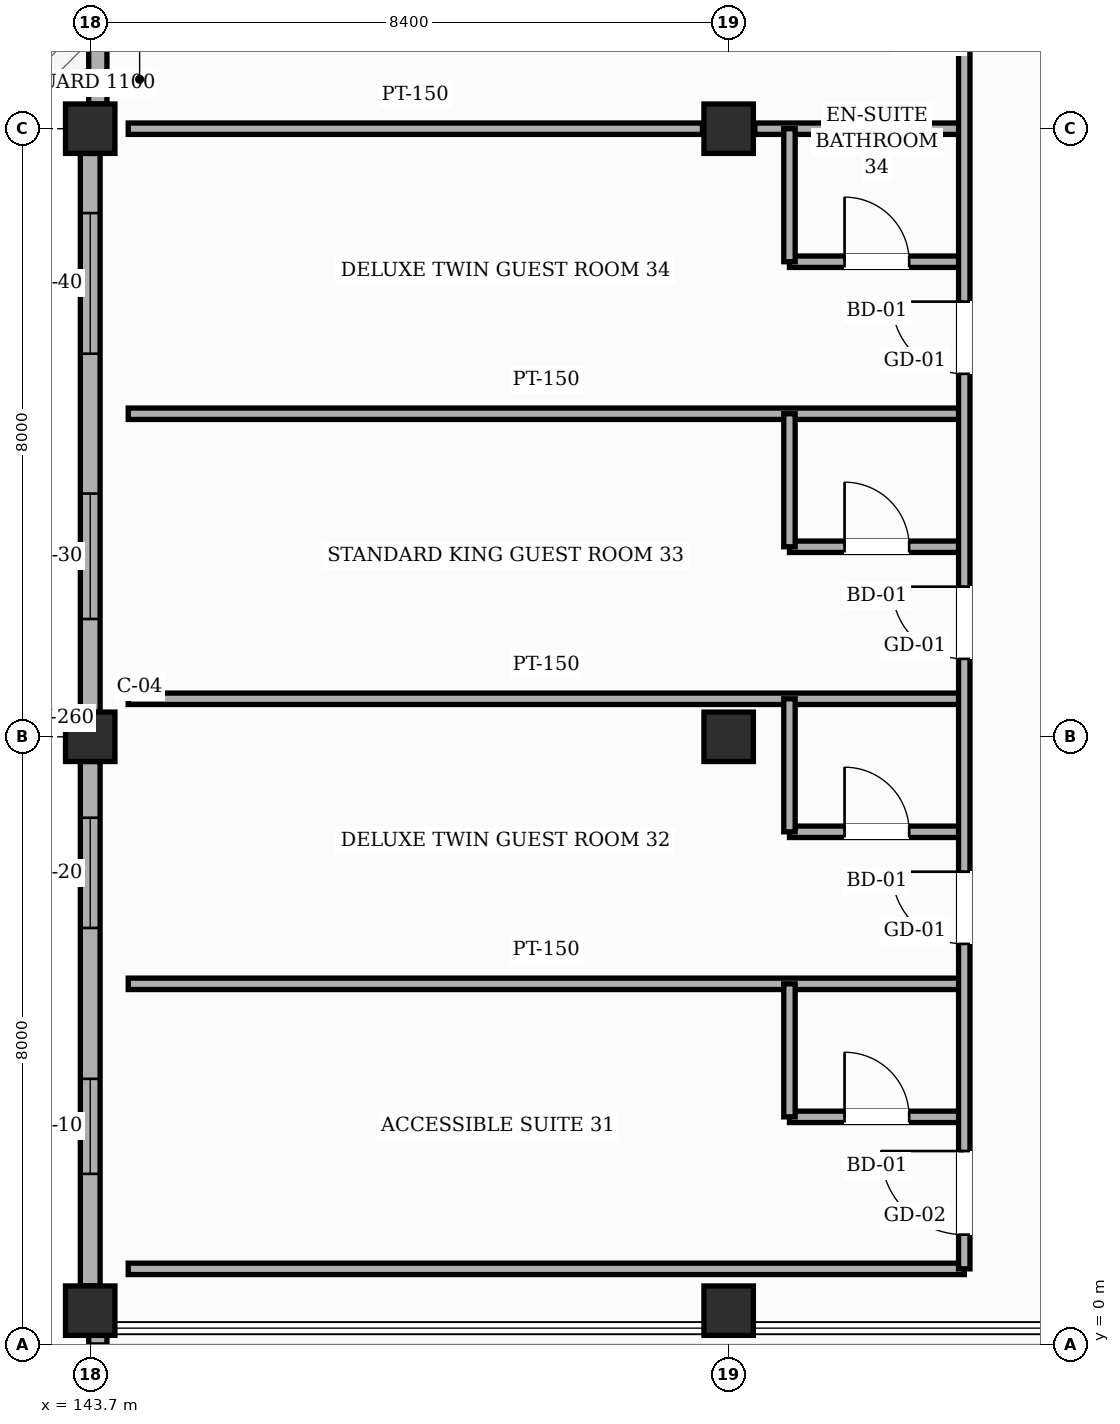
"""IFC4 building model, lengths in metres.
Left out: names, types, materials, properties, quantities, classifications, styles, units other than length and angle.
Written with IfcOpenShell. Run it as: python <this file> out.ifc"""

import sys

from ifc_helpers import new_model, si_unit, direction, frame, frame_2d, origin, origin_2d, place, context, subcontext, project, spatial, rectangle, hollow_rectangle, extrude, element, fill, save


model = new_model("IFC4")
c1 = context("Model", 3, precision=1e-05, world=origin(), true_north=direction((0.0, 1.0)))
c2 = subcontext(c1, "Body", "Model", "MODEL_VIEW")
j1 = project(units=[si_unit("LENGTHUNIT", "METRE"), si_unit("PLANEANGLEUNIT", "RADIAN")], contexts=[c1])
p1 = place(None, origin())
s1 = spatial("IfcSite", under=j1, at=p1, CompositionType="ELEMENT")
p2 = place(p1, origin())
s2 = spatial("IfcBuilding", under=s1, at=p2, CompositionType="ELEMENT")
p3 = place(p2, frame((0.0, 0.0, 19.8)))
s3 = spatial("IfcBuildingStorey", under=s2, at=p3, CompositionType="ELEMENT", Elevation=19.8)
for number, where, z_axis, x_axis in (
    (1, (143.7, 0.45, 0.0), (0.0, 0.0, 1.0), (1.0, 0.0, 0.0)),
    (2, (143.7, 8.0, 0.0), (0.0, 0.0, 1.0), (1.0, 0.0, 0.0)),
    (3, (143.7, 16.0, 0.0), (0.0, 0.0, 1.0), (1.0, 0.0, 0.0)),
    (4, (152.1, 0.45, 0.0), (0.0, 0.0, 1.0), (1.0, 0.0, 0.0)),
    (5, (152.1, 8.0, 0.0), (0.0, 0.0, 1.0), (1.0, 0.0, 0.0)),
    (6, (152.1, 16.0, 0.0), (0.0, 0.0, 1.0), (1.0, 0.0, 0.0)),
):
    element("IfcColumn", number, at=place(p3, frame(where, z_axis=z_axis, x_axis=x_axis)), inside=s3, PredefinedType="COLUMN", context=c2, shape_type="SweptSolid", body=[
        extrude(hollow_rectangle(XDim=0.65, YDim=0.65, WallThickness=0.025, InnerFilletRadius=0.025, OuterFilletRadius=0.05, at=origin_2d()), origin(), (0.0, 0.0, 1.0), 4.8),
    ])
p4 = place(p3, frame((143.7, 0.775, 0.0), z_axis=(0.0, 0.0, 1.0), x_axis=(0.0, 1.0, 0.0)))
e7 = element("IfcWall", 7, at=p4, inside=s3, PredefinedType="SOLIDWALL", context=c2, shape_type="SweptSolid", body=[
    extrude(rectangle(XDim=6.9, YDim=0.26, at=frame_2d((3.45, 0.0))), origin(), (0.0, 0.0, 1.0), 4.005),
])
p5 = place(p4, frame((1.475, 0.0, 0.85)))
e8 = element("IfcOpeningElement", 8, at=p5, cuts=e7, PredefinedType="OPENING", context=c2, shape_type="SweptSolid", body=[
    extrude(rectangle(XDim=1.25, YDim=1.95, at=frame_2d((0.625, 0.975))), frame((0.0, 0.14, 0.0), z_axis=(0.0, -1.0, 0.0), x_axis=(1.0, 0.0, 0.0)), (0.0, 0.0, 1.0), 0.28),
])
p6 = place(p4, frame((4.71, 0.0, 0.85)))
e9 = element("IfcOpeningElement", 9, at=p6, cuts=e7, PredefinedType="OPENING", context=c2, shape_type="SweptSolid", body=[
    extrude(rectangle(XDim=1.45, YDim=1.95, at=frame_2d((0.725, 0.975))), frame((0.0, 0.14, 0.0), z_axis=(0.0, -1.0, 0.0), x_axis=(1.0, 0.0, 0.0)), (0.0, 0.0, 1.0), 0.28),
])
p7 = place(p3, frame((143.7, 8.325, 0.0), z_axis=(0.0, 0.0, 1.0), x_axis=(0.0, 1.0, 0.0)))
e10 = element("IfcWall", 10, at=p7, inside=s3, PredefinedType="SOLIDWALL", context=c2, shape_type="SweptSolid", body=[
    extrude(rectangle(XDim=7.35, YDim=0.26, at=frame_2d((3.675, 0.0))), origin(), (0.0, 0.0, 1.0), 4.005),
])
p8 = place(p7, frame((1.225, 0.0, 0.85)))
e11 = element("IfcOpeningElement", 11, at=p8, cuts=e10, PredefinedType="OPENING", context=c2, shape_type="SweptSolid", body=[
    extrude(rectangle(XDim=1.65, YDim=1.95, at=frame_2d((0.825, 0.975))), frame((0.0, 0.14, 0.0), z_axis=(0.0, -1.0, 0.0), x_axis=(1.0, 0.0, 0.0)), (0.0, 0.0, 1.0), 0.28),
])
p9 = place(p7, frame((4.715, 0.0, 0.85)))
e12 = element("IfcOpeningElement", 12, at=p9, cuts=e10, PredefinedType="OPENING", context=c2, shape_type="SweptSolid", body=[
    extrude(rectangle(XDim=1.85, YDim=1.95, at=frame_2d((0.925, 0.975))), frame((0.0, 0.14, 0.0), z_axis=(0.0, -1.0, 0.0), x_axis=(1.0, 0.0, 0.0)), (0.0, 0.0, 1.0), 0.28),
])
p10 = place(p3, frame((143.8, 0.0, 0.0), z_axis=(0.0, 0.0, 1.0), x_axis=(0.0, 1.0, 0.0)))
e13 = element("IfcWall", 13, at=p10, inside=s3, PredefinedType="SOLIDWALL", context=c2, shape_type="SweptSolid", body=[
    extrude(rectangle(XDim=0.36, YDim=0.24, at=frame_2d((0.18, 0.0))), origin(), (0.0, 0.0, 1.0), 4.565),
])
p11 = place(p3, frame((143.8, 16.325, 0.0), z_axis=(0.0, 0.0, 1.0), x_axis=(0.0, 1.0, 0.0)))
e14 = element("IfcWall", 14, at=p11, inside=s3, PredefinedType="SOLIDWALL", context=c2, shape_type="SweptSolid", body=[
    extrude(rectangle(XDim=1.475, YDim=0.24, at=frame_2d((0.738, 0.0))), origin(), (0.0, 0.0, 1.0), 4.005),
])
p12 = place(p3, frame((144.2, 1.0, 0.0), z_axis=(0.0, 0.0, 1.0), x_axis=(1.0, 0.0, 0.0)))
e15 = element("IfcWall", 15, at=p12, inside=s3, PredefinedType="PARTITIONING", context=c2, shape_type="SweptSolid", body=[
    extrude(rectangle(XDim=11.0, YDim=0.15, at=frame_2d((5.5, 0.0))), origin(), (0.0, 0.0, 1.0), 4.565),
])
p13 = place(p3, frame((152.9, 3.0, 0.0), z_axis=(0.0, 0.0, 1.0), x_axis=(1.0, 0.0, 0.0)))
e16 = element("IfcWall", 16, at=p13, inside=s3, PredefinedType="PARTITIONING", context=c2, shape_type="SweptSolid", body=[
    extrude(rectangle(XDim=2.3, YDim=0.15, at=frame_2d((1.15, 0.0))), origin(), (0.0, 0.0, 1.0), 4.565),
])
p14 = place(p13, frame((0.725, 0.0, 0.0)))
e17 = element("IfcOpeningElement", 17, at=p14, cuts=e16, PredefinedType="OPENING", context=c2, shape_type="SweptSolid", body=[
    extrude(rectangle(XDim=0.85, YDim=2.1, at=frame_2d((0.425, 1.05))), frame((0.0, 0.085, 0.0), z_axis=(0.0, -1.0, 0.0), x_axis=(1.0, 0.0, 0.0)), (0.0, 0.0, 1.0), 0.17),
])
p15 = place(p3, frame((144.2, 4.75, 0.0), z_axis=(0.0, 0.0, 1.0), x_axis=(1.0, 0.0, 0.0)))
e18 = element("IfcWall", 18, at=p15, inside=s3, PredefinedType="PARTITIONING", context=c2, shape_type="SweptSolid", body=[
    extrude(rectangle(XDim=11.0, YDim=0.15, at=frame_2d((5.5, 0.0))), origin(), (0.0, 0.0, 1.0), 4.565),
])
p16 = place(p3, frame((152.9, 6.75, 0.0), z_axis=(0.0, 0.0, 1.0), x_axis=(1.0, 0.0, 0.0)))
e19 = element("IfcWall", 19, at=p16, inside=s3, PredefinedType="PARTITIONING", context=c2, shape_type="SweptSolid", body=[
    extrude(rectangle(XDim=2.3, YDim=0.15, at=frame_2d((1.15, 0.0))), origin(), (0.0, 0.0, 1.0), 4.565),
])
p17 = place(p16, frame((0.725, 0.0, 0.0)))
e20 = element("IfcOpeningElement", 20, at=p17, cuts=e19, PredefinedType="OPENING", context=c2, shape_type="SweptSolid", body=[
    extrude(rectangle(XDim=0.85, YDim=2.1, at=frame_2d((0.425, 1.05))), frame((0.0, 0.085, 0.0), z_axis=(0.0, -1.0, 0.0), x_axis=(1.0, 0.0, 0.0)), (0.0, 0.0, 1.0), 0.17),
])
p18 = place(p3, frame((144.2, 8.5, 0.0), z_axis=(0.0, 0.0, 1.0), x_axis=(1.0, 0.0, 0.0)))
e21 = element("IfcWall", 21, at=p18, inside=s3, PredefinedType="PARTITIONING", context=c2, shape_type="SweptSolid", body=[
    extrude(rectangle(XDim=11.0, YDim=0.15, at=frame_2d((5.5, 0.0))), origin(), (0.0, 0.0, 1.0), 4.565),
])
p19 = place(p3, frame((152.9, 10.5, 0.0), z_axis=(0.0, 0.0, 1.0), x_axis=(1.0, 0.0, 0.0)))
e22 = element("IfcWall", 22, at=p19, inside=s3, PredefinedType="PARTITIONING", context=c2, shape_type="SweptSolid", body=[
    extrude(rectangle(XDim=2.3, YDim=0.15, at=frame_2d((1.15, 0.0))), origin(), (0.0, 0.0, 1.0), 4.565),
])
p20 = place(p19, frame((0.725, 0.0, 0.0)))
e23 = element("IfcOpeningElement", 23, at=p20, cuts=e22, PredefinedType="OPENING", context=c2, shape_type="SweptSolid", body=[
    extrude(rectangle(XDim=0.85, YDim=2.1, at=frame_2d((0.425, 1.05))), frame((0.0, 0.085, 0.0), z_axis=(0.0, -1.0, 0.0), x_axis=(1.0, 0.0, 0.0)), (0.0, 0.0, 1.0), 0.17),
])
p21 = place(p3, frame((144.2, 12.25, 0.0), z_axis=(0.0, 0.0, 1.0), x_axis=(1.0, 0.0, 0.0)))
e24 = element("IfcWall", 24, at=p21, inside=s3, PredefinedType="PARTITIONING", context=c2, shape_type="SweptSolid", body=[
    extrude(rectangle(XDim=11.0, YDim=0.15, at=frame_2d((5.5, 0.0))), origin(), (0.0, 0.0, 1.0), 4.205),
])
p22 = place(p3, frame((152.9, 14.25, 0.0), z_axis=(0.0, 0.0, 1.0), x_axis=(1.0, 0.0, 0.0)))
e25 = element("IfcWall", 25, at=p22, inside=s3, PredefinedType="PARTITIONING", context=c2, shape_type="SweptSolid", body=[
    extrude(rectangle(XDim=2.3, YDim=0.15, at=frame_2d((1.15, 0.0))), origin(), (0.0, 0.0, 1.0), 4.565),
])
p23 = place(p22, frame((0.725, 0.0, 0.0)))
e26 = element("IfcOpeningElement", 26, at=p23, cuts=e25, PredefinedType="OPENING", context=c2, shape_type="SweptSolid", body=[
    extrude(rectangle(XDim=0.85, YDim=2.1, at=frame_2d((0.425, 1.05))), frame((0.0, 0.085, 0.0), z_axis=(0.0, -1.0, 0.0), x_axis=(1.0, 0.0, 0.0)), (0.0, 0.0, 1.0), 0.17),
])
p24 = place(p3, frame((144.2, 16.0, 0.0), z_axis=(0.0, 0.0, 1.0), x_axis=(1.0, 0.0, 0.0)))
e27 = element("IfcWall", 27, at=p24, inside=s3, PredefinedType="PARTITIONING", context=c2, shape_type="SweptSolid", body=[
    extrude(rectangle(XDim=7.555, YDim=0.15, at=frame_2d((3.777, 0.0))), origin(), (0.0, 0.0, 1.0), 3.905),
])
p25 = place(p3, frame((152.445, 16.0, 0.0), z_axis=(0.0, 0.0, 1.0), x_axis=(1.0, 0.0, 0.0)))
e28 = element("IfcWall", 28, at=p25, inside=s3, PredefinedType="PARTITIONING", context=c2, shape_type="SweptSolid", body=[
    extrude(rectangle(XDim=2.755, YDim=0.15, at=frame_2d((1.377, 0.0))), origin(), (0.0, 0.0, 1.0), 3.905),
])
for number, where, z_axis, x_axis in (
    (29, (152.9, 3.0, 0.0), (0.0, 0.0, 1.0), (0.0, 1.0, 0.0)),
    (30, (152.9, 6.75, 0.0), (0.0, 0.0, 1.0), (0.0, 1.0, 0.0)),
    (31, (152.9, 10.5, 0.0), (0.0, 0.0, 1.0), (0.0, 1.0, 0.0)),
    (32, (152.9, 14.25, 0.0), (0.0, 0.0, 1.0), (0.0, 1.0, 0.0)),
):
    element("IfcWall", number, at=place(p3, frame(where, z_axis=z_axis, x_axis=x_axis)), inside=s3, PredefinedType="PARTITIONING", context=c2, shape_type="SweptSolid", body=[
        extrude(rectangle(XDim=1.75, YDim=0.15, at=frame_2d((0.875, 0.0))), origin(), (0.0, 0.0, 1.0), 4.565),
    ])
p26 = place(p3, frame((155.2, 1.0, 0.0), z_axis=(0.0, 0.0, 1.0), x_axis=(0.0, 1.0, 0.0)))
e33 = element("IfcWall", 33, at=p26, inside=s3, PredefinedType="PARTITIONING", context=c2, shape_type="SweptSolid", body=[
    extrude(rectangle(XDim=25.6, YDim=0.15, at=frame_2d((12.8, 0.0))), origin(), (0.0, 0.0, 1.0), 4.565),
])
p27 = place(p26, frame((19.55, 0.0, 0.0)))
e34 = element("IfcOpeningElement", 34, at=p27, cuts=e33, PredefinedType="OPENING", context=c2, shape_type="SweptSolid", body=[
    extrude(rectangle(XDim=1.5, YDim=2.3, at=frame_2d((0.75, 1.15))), frame((0.0, 0.085, 0.0), z_axis=(0.0, -1.0, 0.0), x_axis=(1.0, 0.0, 0.0)), (0.0, 0.0, 1.0), 0.17),
])
p28 = place(p26, frame((0.45, 0.0, 0.0)))
e35 = element("IfcOpeningElement", 35, at=p28, cuts=e33, PredefinedType="OPENING", context=c2, shape_type="SweptSolid", body=[
    extrude(rectangle(XDim=1.1, YDim=2.2, at=frame_2d((0.55, 1.1))), frame((0.0, 0.085, 0.0), z_axis=(0.0, -1.0, 0.0), x_axis=(1.0, 0.0, 0.0)), (0.0, 0.0, 1.0), 0.17),
])
p29 = place(p26, frame((4.275, 0.0, 0.0)))
e36 = element("IfcOpeningElement", 36, at=p29, cuts=e33, PredefinedType="OPENING", context=c2, shape_type="SweptSolid", body=[
    extrude(rectangle(XDim=0.95, YDim=2.15, at=frame_2d((0.475, 1.075))), frame((0.0, 0.085, 0.0), z_axis=(0.0, -1.0, 0.0), x_axis=(1.0, 0.0, 0.0)), (0.0, 0.0, 1.0), 0.17),
])
p30 = place(p26, frame((8.025, 0.0, 0.0)))
e37 = element("IfcOpeningElement", 37, at=p30, cuts=e33, PredefinedType="OPENING", context=c2, shape_type="SweptSolid", body=[
    extrude(rectangle(XDim=0.95, YDim=2.15, at=frame_2d((0.475, 1.075))), frame((0.0, 0.085, 0.0), z_axis=(0.0, -1.0, 0.0), x_axis=(1.0, 0.0, 0.0)), (0.0, 0.0, 1.0), 0.17),
])
p31 = place(p26, frame((11.775, 0.0, 0.0)))
e38 = element("IfcOpeningElement", 38, at=p31, cuts=e33, PredefinedType="OPENING", context=c2, shape_type="SweptSolid", body=[
    extrude(rectangle(XDim=0.95, YDim=2.15, at=frame_2d((0.475, 1.075))), frame((0.0, 0.085, 0.0), z_axis=(0.0, -1.0, 0.0), x_axis=(1.0, 0.0, 0.0)), (0.0, 0.0, 1.0), 0.17),
])
p32 = place(p5, origin())
e39 = element("IfcWindow", 39, at=p32, inside=s3, PartitioningType="SINGLE_PANEL", PredefinedType="WINDOW", context=c2, shape_type="SweptSolid", body=[
    extrude(rectangle(XDim=1.25, YDim=1.95, at=frame_2d((0.625, 0.975))), frame((0.0, 0.03, 0.0), z_axis=(0.0, -1.0, 0.0), x_axis=(1.0, 0.0, 0.0)), (0.0, 0.0, 1.0), 0.06),
])
fill(e8, e39)
p33 = place(p6, origin())
e40 = element("IfcWindow", 40, at=p33, inside=s3, PartitioningType="SINGLE_PANEL", PredefinedType="WINDOW", context=c2, shape_type="SweptSolid", body=[
    extrude(rectangle(XDim=1.45, YDim=1.95, at=frame_2d((0.725, 0.975))), frame((0.0, 0.03, 0.0), z_axis=(0.0, -1.0, 0.0), x_axis=(1.0, 0.0, 0.0)), (0.0, 0.0, 1.0), 0.06),
])
fill(e9, e40)
p34 = place(p8, origin())
e41 = element("IfcWindow", 41, at=p34, inside=s3, PartitioningType="SINGLE_PANEL", PredefinedType="WINDOW", context=c2, shape_type="SweptSolid", body=[
    extrude(rectangle(XDim=1.65, YDim=1.95, at=frame_2d((0.825, 0.975))), frame((0.0, 0.03, 0.0), z_axis=(0.0, -1.0, 0.0), x_axis=(1.0, 0.0, 0.0)), (0.0, 0.0, 1.0), 0.06),
])
fill(e11, e41)
p35 = place(p9, origin())
e42 = element("IfcWindow", 42, at=p35, inside=s3, PartitioningType="SINGLE_PANEL", PredefinedType="WINDOW", context=c2, shape_type="SweptSolid", body=[
    extrude(rectangle(XDim=1.85, YDim=1.95, at=frame_2d((0.925, 0.975))), frame((0.0, 0.03, 0.0), z_axis=(0.0, -1.0, 0.0), x_axis=(1.0, 0.0, 0.0)), (0.0, 0.0, 1.0), 0.06),
])
fill(e12, e42)
p36 = place(p28, origin())
e43 = element("IfcDoor", 43, at=p36, inside=s3, OperationType="SINGLE_SWING_RIGHT", PredefinedType="DOOR", context=c2, shape_type="SweptSolid", body=[
    extrude(rectangle(XDim=1.1, YDim=2.2, at=frame_2d((0.55, 1.1))), frame((0.0, 0.025, 0.0), z_axis=(0.0, -1.0, 0.0), x_axis=(1.0, 0.0, 0.0)), (0.0, 0.0, 1.0), 0.05),
])
fill(e35, e43)
p37 = place(p14, origin())
e44 = element("IfcDoor", 44, at=p37, inside=s3, OperationType="SINGLE_SWING_LEFT", PredefinedType="DOOR", context=c2, shape_type="SweptSolid", body=[
    extrude(rectangle(XDim=0.85, YDim=2.1, at=frame_2d((0.425, 1.05))), frame((0.0, 0.025, 0.0), z_axis=(0.0, -1.0, 0.0), x_axis=(1.0, 0.0, 0.0)), (0.0, 0.0, 1.0), 0.05),
])
fill(e17, e44)
p38 = place(p29, origin())
e45 = element("IfcDoor", 45, at=p38, inside=s3, OperationType="SINGLE_SWING_RIGHT", PredefinedType="DOOR", context=c2, shape_type="SweptSolid", body=[
    extrude(rectangle(XDim=0.95, YDim=2.15, at=frame_2d((0.475, 1.075))), frame((0.0, 0.025, 0.0), z_axis=(0.0, -1.0, 0.0), x_axis=(1.0, 0.0, 0.0)), (0.0, 0.0, 1.0), 0.05),
])
fill(e36, e45)
p39 = place(p17, origin())
e46 = element("IfcDoor", 46, at=p39, inside=s3, OperationType="SINGLE_SWING_LEFT", PredefinedType="DOOR", context=c2, shape_type="SweptSolid", body=[
    extrude(rectangle(XDim=0.85, YDim=2.1, at=frame_2d((0.425, 1.05))), frame((0.0, 0.025, 0.0), z_axis=(0.0, -1.0, 0.0), x_axis=(1.0, 0.0, 0.0)), (0.0, 0.0, 1.0), 0.05),
])
fill(e20, e46)
p40 = place(p30, origin())
e47 = element("IfcDoor", 47, at=p40, inside=s3, OperationType="SINGLE_SWING_RIGHT", PredefinedType="DOOR", context=c2, shape_type="SweptSolid", body=[
    extrude(rectangle(XDim=0.95, YDim=2.15, at=frame_2d((0.475, 1.075))), frame((0.0, 0.025, 0.0), z_axis=(0.0, -1.0, 0.0), x_axis=(1.0, 0.0, 0.0)), (0.0, 0.0, 1.0), 0.05),
])
fill(e37, e47)
p41 = place(p20, origin())
e48 = element("IfcDoor", 48, at=p41, inside=s3, OperationType="SINGLE_SWING_LEFT", PredefinedType="DOOR", context=c2, shape_type="SweptSolid", body=[
    extrude(rectangle(XDim=0.85, YDim=2.1, at=frame_2d((0.425, 1.05))), frame((0.0, 0.025, 0.0), z_axis=(0.0, -1.0, 0.0), x_axis=(1.0, 0.0, 0.0)), (0.0, 0.0, 1.0), 0.05),
])
fill(e23, e48)
p42 = place(p31, origin())
e49 = element("IfcDoor", 49, at=p42, inside=s3, OperationType="SINGLE_SWING_RIGHT", PredefinedType="DOOR", context=c2, shape_type="SweptSolid", body=[
    extrude(rectangle(XDim=0.95, YDim=2.15, at=frame_2d((0.475, 1.075))), frame((0.0, 0.025, 0.0), z_axis=(0.0, -1.0, 0.0), x_axis=(1.0, 0.0, 0.0)), (0.0, 0.0, 1.0), 0.05),
])
fill(e38, e49)
p43 = place(p23, origin())
e50 = element("IfcDoor", 50, at=p43, inside=s3, OperationType="SINGLE_SWING_LEFT", PredefinedType="DOOR", context=c2, shape_type="SweptSolid", body=[
    extrude(rectangle(XDim=0.85, YDim=2.1, at=frame_2d((0.425, 1.05))), frame((0.0, 0.025, 0.0), z_axis=(0.0, -1.0, 0.0), x_axis=(1.0, 0.0, 0.0)), (0.0, 0.0, 1.0), 0.05),
])
fill(e26, e50)
save(model, sys.argv[1])
